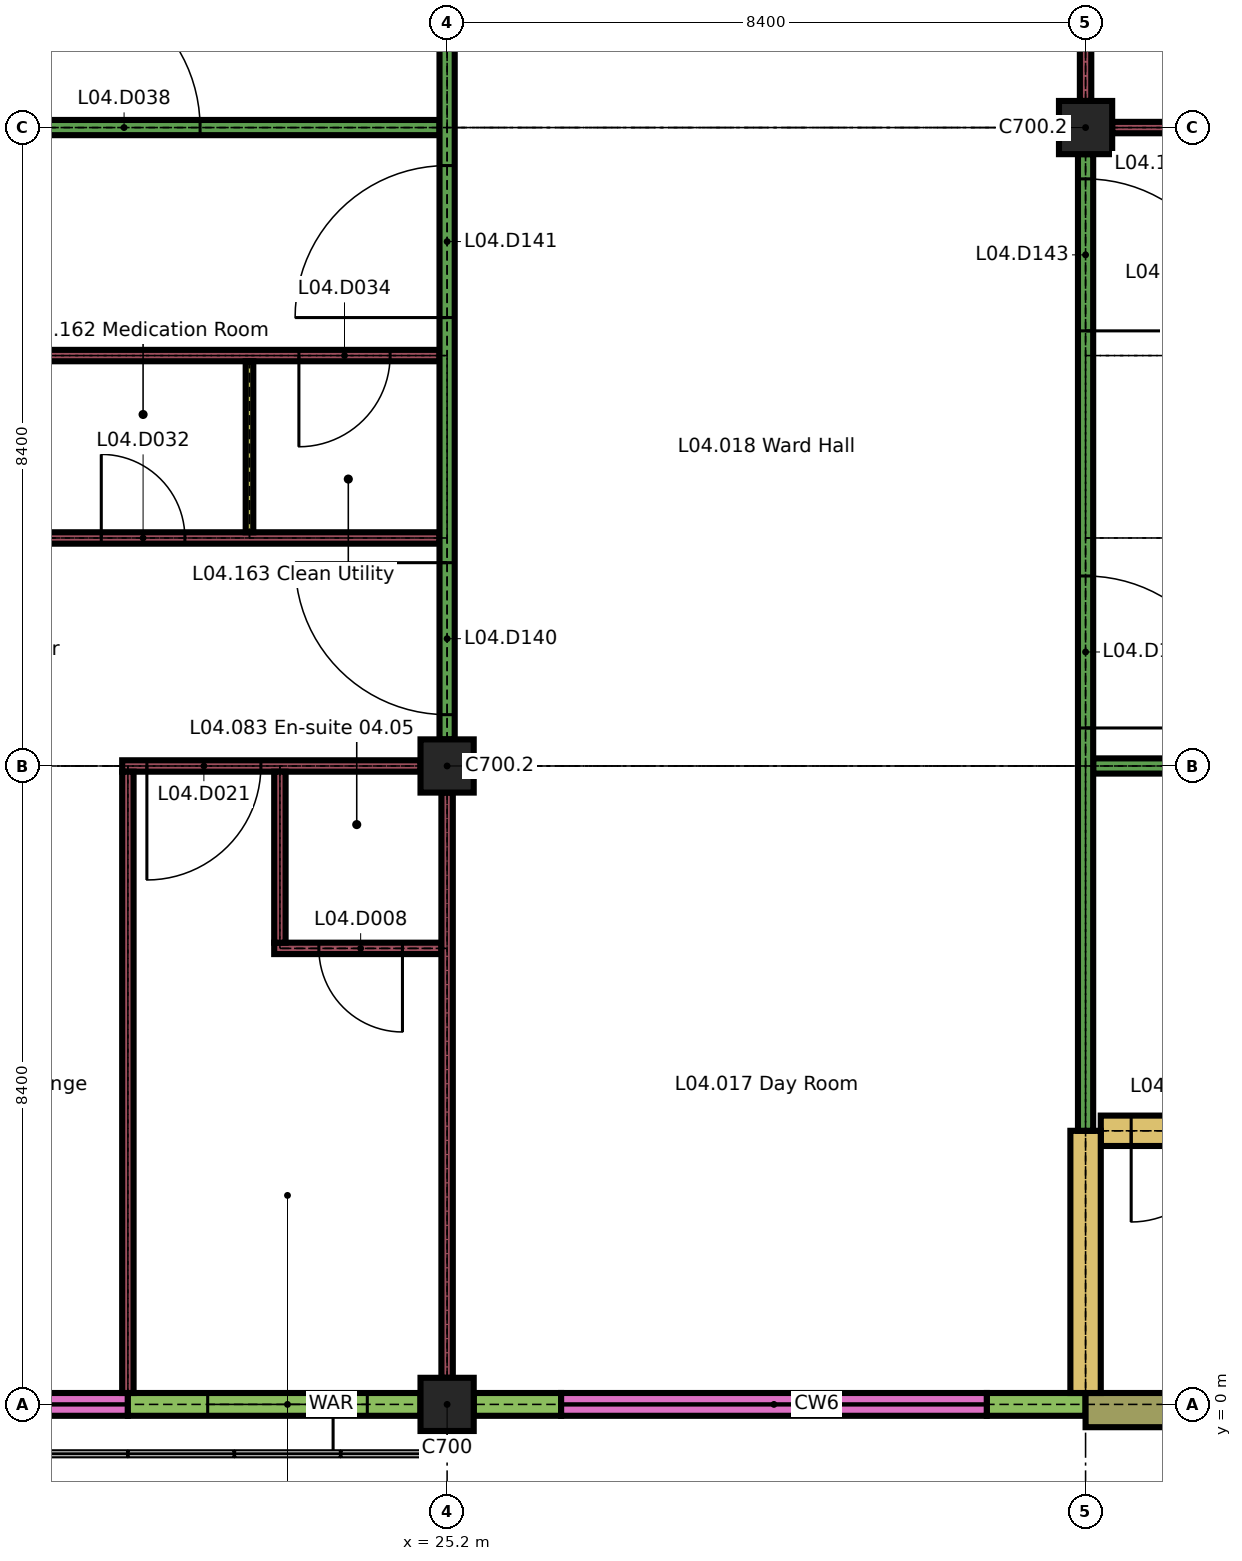
"""IFC4 building model, lengths in metres.
Left out: names, types, materials, properties, quantities, classifications, styles, units other than length and angle.
Written with IfcOpenShell. Run it as: python <this file> out.ifc"""

import sys

from ifc_helpers import new_model, si_unit, direction, frame, frame_2d, origin, origin_2d, place, context, subcontext, project, spatial, rectangle, extrude, element, fill, save


model = new_model("IFC4")
c1 = context("Model", 3, precision=1e-05, world=origin(), true_north=direction((0.0, 1.0)))
c2 = subcontext(c1, "Body", "Model", "MODEL_VIEW")
j1 = project(units=[si_unit("LENGTHUNIT", "METRE"), si_unit("PLANEANGLEUNIT", "RADIAN")], contexts=[c1])
p1 = place(None, origin())
s1 = spatial("IfcSite", under=j1, at=p1, CompositionType="ELEMENT")
p2 = place(p1, origin())
s2 = spatial("IfcBuilding", under=s1, at=p2, CompositionType="ELEMENT")
p3 = place(p2, frame((0.0, 0.0, 18.9)))
s3 = spatial("IfcBuildingStorey", under=s2, at=p3, CompositionType="ELEMENT", Elevation=18.9)
for number, where, z_axis, x_axis in (
    (1, (25.2, 0.0, 0.0), (0.0, 0.0, 1.0), (1.0, 0.0, 0.0)),
    (2, (25.2, 8.4, 0.0), (0.0, 0.0, 1.0), (1.0, 0.0, 0.0)),
    (3, (33.6, 16.8, 0.0), (0.0, 0.0, 1.0), (1.0, 0.0, 0.0)),
):
    element("IfcColumn", number, at=place(p3, frame(where, z_axis=z_axis, x_axis=x_axis)), inside=s3, PredefinedType="COLUMN", context=c2, shape_type="SweptSolid", body=[
        extrude(rectangle(XDim=0.7, YDim=0.7, at=origin_2d()), origin(), (0.0, 0.0, 1.0), 3.26),
    ])
p4 = place(p3, frame((17.15, 0.0, 0.0), z_axis=(0.0, 0.0, 1.0), x_axis=(1.0, 0.0, 0.0)))
e4 = element("IfcWall", 4, at=p4, inside=s3, PredefinedType="SOLIDWALL", context=c2, shape_type="SweptSolid", body=[
    extrude(rectangle(XDim=3.85, YDim=0.3, at=frame_2d((1.925, 0.0))), origin(), (0.0, 0.0, 1.0), 0.6),
])
p5 = place(p3, frame((21.0, 0.0, 0.0), z_axis=(0.0, 0.0, 1.0), x_axis=(1.0, 0.0, 0.0)))
e5 = element("IfcWall", 5, at=p5, inside=s3, PredefinedType="SOLIDWALL", context=c2, shape_type="SweptSolid", body=[
    extrude(rectangle(XDim=3.85, YDim=0.3, at=frame_2d((1.925, 0.0))), origin(), (0.0, 0.0, 1.0), 2.96),
])
p6 = place(p5, frame((1.05, 0.0, 0.9)))
e6 = element("IfcOpeningElement", 6, at=p6, cuts=e5, PredefinedType="OPENING", context=c2, shape_type="SweptSolid", body=[
    extrude(rectangle(XDim=2.1, YDim=1.5, at=frame_2d((1.05, 0.75))), frame((0.0, 0.16, 0.0), z_axis=(0.0, -1.0, 0.0), x_axis=(1.0, 0.0, 0.0)), (0.0, 0.0, 1.0), 0.32),
])
p7 = place(p3, frame((25.55, 0.0, 0.0), z_axis=(0.0, 0.0, 1.0), x_axis=(1.0, 0.0, 0.0)))
e7 = element("IfcWall", 7, at=p7, inside=s3, PredefinedType="SOLIDWALL", context=c2, shape_type="SweptSolid", body=[
    extrude(rectangle(XDim=1.15, YDim=0.3, at=frame_2d((0.575, 0.0))), origin(), (0.0, 0.0, 1.0), 2.96),
])
p8 = place(p3, frame((32.3, 0.0, 0.0), z_axis=(0.0, 0.0, 1.0), x_axis=(1.0, 0.0, 0.0)))
e8 = element("IfcWall", 8, at=p8, inside=s3, PredefinedType="SOLIDWALL", context=c2, shape_type="SweptSolid", body=[
    extrude(rectangle(XDim=1.3, YDim=0.3, at=frame_2d((0.65, 0.0))), origin(), (0.0, 0.0, 1.0), 2.96),
])
p9 = place(p3, frame((26.7, 0.0, 0.0), z_axis=(0.0, 0.0, 1.0), x_axis=(1.0, 0.0, 0.0)))
e9 = element("IfcWall", 9, at=p9, inside=s3, PredefinedType="SOLIDWALL", context=c2, shape_type="SweptSolid", body=[
    extrude(rectangle(XDim=5.6, YDim=0.3, at=frame_2d((2.8, 0.0))), origin(), (0.0, 0.0, 1.0), 0.6),
])
p10 = place(p3, frame((33.6, -0.075, 0.0), z_axis=(0.0, 0.0, 1.0), x_axis=(1.0, 0.0, 0.0)))
e10 = element("IfcWall", 10, at=p10, inside=s3, PredefinedType="SOLIDWALL", context=c2, shape_type="SweptSolid", body=[
    extrude(rectangle(XDim=3.15, YDim=0.45, at=frame_2d((1.575, 0.0))), origin(), (0.0, 0.0, 1.0), 3.26),
])
p11 = place(p3, frame((33.8, 3.6, 0.0), z_axis=(0.0, 0.0, 1.0), x_axis=(1.0, 0.0, 0.0)))
e11 = element("IfcWall", 11, at=p11, inside=s3, PredefinedType="SHEAR", context=c2, shape_type="SweptSolid", body=[
    extrude(rectangle(XDim=8.05, YDim=0.4, at=frame_2d((4.025, 0.0))), origin(), (0.0, 0.0, 1.0), 3.26),
])
p12 = place(p11, frame((0.4, 0.0, 0.0)))
e12 = element("IfcOpeningElement", 12, at=p12, cuts=e11, PredefinedType="OPENING", context=c2, shape_type="SweptSolid", body=[
    extrude(rectangle(XDim=1.2, YDim=2.1, at=frame_2d((0.6, 1.05))), frame((0.0, 0.21, 0.0), z_axis=(0.0, -1.0, 0.0), x_axis=(1.0, 0.0, 0.0)), (0.0, 0.0, 1.0), 0.42),
])
p13 = place(p3, frame((22.925, 6.0, 0.0), z_axis=(0.0, 0.0, 1.0), x_axis=(1.0, 0.0, 0.0)))
e13 = element("IfcWall", 13, at=p13, inside=s3, PredefinedType="PARTITIONING", context=c2, shape_type="SweptSolid", body=[
    extrude(rectangle(XDim=2.2, YDim=0.15, at=frame_2d((1.1, 0.0))), origin(), (0.0, 0.0, 1.0), 3.26),
])
p14 = place(p13, frame((0.587, 0.0, 0.0)))
e14 = element("IfcOpeningElement", 14, at=p14, cuts=e13, PredefinedType="OPENING", context=c2, shape_type="SweptSolid", body=[
    extrude(rectangle(XDim=1.1, YDim=2.1, at=frame_2d((0.55, 1.05))), frame((0.0, 0.085, 0.0), z_axis=(0.0, -1.0, 0.0), x_axis=(1.0, 0.0, 0.0)), (0.0, 0.0, 1.0), 0.17),
])
p15 = place(p3, frame((20.925, 8.4, 0.0), z_axis=(0.0, 0.0, 1.0), x_axis=(1.0, 0.0, 0.0)))
e15 = element("IfcWall", 15, at=p15, inside=s3, PredefinedType="PARTITIONING", context=c2, shape_type="SweptSolid", body=[
    extrude(rectangle(XDim=3.925, YDim=0.15, at=frame_2d((1.962, 0.0))), origin(), (0.0, 0.0, 1.0), 3.26),
])
p16 = place(p15, frame((0.325, 0.0, 0.0)))
e16 = element("IfcOpeningElement", 16, at=p16, cuts=e15, PredefinedType="OPENING", context=c2, shape_type="SweptSolid", body=[
    extrude(rectangle(XDim=1.5, YDim=2.4, at=frame_2d((0.75, 1.2))), frame((0.0, 0.085, 0.0), z_axis=(0.0, -1.0, 0.0), x_axis=(1.0, 0.0, 0.0)), (0.0, 0.0, 1.0), 0.17),
])
p17 = place(p3, frame((33.7, 8.4, 0.0), z_axis=(0.0, 0.0, 1.0), x_axis=(1.0, 0.0, 0.0)))
e17 = element("IfcWall", 17, at=p17, inside=s3, PredefinedType="PARTITIONING", context=c2, shape_type="SweptSolid", body=[
    extrude(rectangle(XDim=8.15, YDim=0.2, at=frame_2d((4.075, 0.0))), origin(), (0.0, 0.0, 1.0), 3.26),
])
p18 = place(p17, frame((3.075, 0.0, 0.0)))
e18 = element("IfcOpeningElement", 18, at=p18, cuts=e17, PredefinedType="OPENING", context=c2, shape_type="SweptSolid", body=[
    extrude(rectangle(XDim=2.0, YDim=2.4, at=frame_2d((1.0, 1.2))), frame((0.0, 0.11, 0.0), z_axis=(0.0, -1.0, 0.0), x_axis=(1.0, 0.0, 0.0)), (0.0, 0.0, 1.0), 0.22),
])
p19 = place(p3, frame((19.725, 11.4, 0.0), z_axis=(0.0, 0.0, 1.0), x_axis=(1.0, 0.0, 0.0)))
e19 = element("IfcWall", 19, at=p19, inside=s3, PredefinedType="PARTITIONING", context=c2, shape_type="SweptSolid", body=[
    extrude(rectangle(XDim=5.375, YDim=0.15, at=frame_2d((2.688, 0.0))), origin(), (0.0, 0.0, 1.0), 3.26),
])
p20 = place(p19, frame((0.925, 0.0, 0.0)))
e20 = element("IfcOpeningElement", 20, at=p20, cuts=e19, PredefinedType="OPENING", context=c2, shape_type="SweptSolid", body=[
    extrude(rectangle(XDim=1.1, YDim=2.1, at=frame_2d((0.55, 1.05))), frame((0.0, 0.085, 0.0), z_axis=(0.0, -1.0, 0.0), x_axis=(1.0, 0.0, 0.0)), (0.0, 0.0, 1.0), 0.17),
])
p21 = place(p3, frame((11.325, 13.8, 0.0), z_axis=(0.0, 0.0, 1.0), x_axis=(1.0, 0.0, 0.0)))
e21 = element("IfcWall", 21, at=p21, inside=s3, PredefinedType="PARTITIONING", context=c2, shape_type="SweptSolid", body=[
    extrude(rectangle(XDim=13.775, YDim=0.15, at=frame_2d((6.888, 0.0))), origin(), (0.0, 0.0, 1.0), 3.26),
])
p22 = place(p21, frame((11.925, 0.0, 0.0)))
e22 = element("IfcOpeningElement", 22, at=p22, cuts=e21, PredefinedType="OPENING", context=c2, shape_type="SweptSolid", body=[
    extrude(rectangle(XDim=1.2, YDim=2.1, at=frame_2d((0.6, 1.05))), frame((0.0, 0.085, 0.0), z_axis=(0.0, -1.0, 0.0), x_axis=(1.0, 0.0, 0.0)), (0.0, 0.0, 1.0), 0.17),
])
p23 = place(p3, frame((16.7, 16.8, 0.0), z_axis=(0.0, 0.0, 1.0), x_axis=(1.0, 0.0, 0.0)))
e23 = element("IfcWall", 23, at=p23, inside=s3, PredefinedType="PARTITIONING", context=c2, shape_type="SweptSolid", body=[
    extrude(rectangle(XDim=8.4, YDim=0.2, at=frame_2d((4.2, 0.0))), origin(), (0.0, 0.0, 1.0), 3.26),
])
p24 = place(p23, frame((3.25, 0.0, 0.0)))
e24 = element("IfcOpeningElement", 24, at=p24, cuts=e23, PredefinedType="OPENING", context=c2, shape_type="SweptSolid", body=[
    extrude(rectangle(XDim=2.0, YDim=2.4, at=frame_2d((1.0, 1.2))), frame((0.0, 0.11, 0.0), z_axis=(0.0, -1.0, 0.0), x_axis=(1.0, 0.0, 0.0)), (0.0, 0.0, 1.0), 0.22),
])
p25 = place(p3, frame((33.95, 16.8, 0.0), z_axis=(0.0, 0.0, 1.0), x_axis=(1.0, 0.0, 0.0)))
e25 = element("IfcWall", 25, at=p25, inside=s3, PredefinedType="PARTITIONING", context=c2, shape_type="SweptSolid", body=[
    extrude(rectangle(XDim=7.675, YDim=0.15, at=frame_2d((3.837, 0.0))), origin(), (0.0, 0.0, 1.0), 3.26),
])
p26 = place(p25, frame((2.1, 0.0, 0.0)))
e26 = element("IfcOpeningElement", 26, at=p26, cuts=e25, PredefinedType="OPENING", context=c2, shape_type="SweptSolid", body=[
    extrude(rectangle(XDim=1.5, YDim=2.4, at=frame_2d((0.75, 1.2))), frame((0.0, 0.085, 0.0), z_axis=(0.0, -1.0, 0.0), x_axis=(1.0, 0.0, 0.0)), (0.0, 0.0, 1.0), 0.17),
])
p27 = place(p25, frame((5.163, 0.0, 0.0)))
e27 = element("IfcOpeningElement", 27, at=p27, cuts=e25, PredefinedType="OPENING", context=c2, shape_type="SweptSolid", body=[
    extrude(rectangle(XDim=1.2, YDim=2.1, at=frame_2d((0.6, 1.05))), frame((0.0, 0.085, 0.0), z_axis=(0.0, -1.0, 0.0), x_axis=(1.0, 0.0, 0.0)), (0.0, 0.0, 1.0), 0.17),
])
p28 = place(p3, frame((21.0, 0.15, 0.0), z_axis=(0.0, 0.0, 1.0), x_axis=(0.0, 1.0, 0.0)))
e28 = element("IfcWall", 28, at=p28, inside=s3, PredefinedType="PARTITIONING", context=c2, shape_type="SweptSolid", body=[
    extrude(rectangle(XDim=8.175, YDim=0.15, at=frame_2d((4.087, 0.0))), origin(), (0.0, 0.0, 1.0), 3.26),
])
p29 = place(p3, frame((22.6, 11.475, 0.0), z_axis=(0.0, 0.0, 1.0), x_axis=(0.0, 1.0, 0.0)))
e29 = element("IfcWall", 29, at=p29, inside=s3, PredefinedType="PARTITIONING", context=c2, shape_type="SweptSolid", body=[
    extrude(rectangle(XDim=2.25, YDim=0.1, at=frame_2d((1.125, 0.0))), origin(), (0.0, 0.0, 1.0), 3.26),
])
p30 = place(p3, frame((23.0, 6.075, 0.0), z_axis=(0.0, 0.0, 1.0), x_axis=(0.0, 1.0, 0.0)))
e30 = element("IfcWall", 30, at=p30, inside=s3, PredefinedType="PARTITIONING", context=c2, shape_type="SweptSolid", body=[
    extrude(rectangle(XDim=2.25, YDim=0.15, at=frame_2d((1.125, 0.0))), origin(), (0.0, 0.0, 1.0), 3.26),
])
p31 = place(p3, frame((25.2, 0.35, 0.0), z_axis=(0.0, 0.0, 1.0), x_axis=(0.0, 1.0, 0.0)))
e31 = element("IfcWall", 31, at=p31, inside=s3, PredefinedType="PARTITIONING", context=c2, shape_type="SweptSolid", body=[
    extrude(rectangle(XDim=7.7, YDim=0.15, at=frame_2d((3.85, 0.0))), origin(), (0.0, 0.0, 1.0), 3.26),
])
p32 = place(p3, frame((25.2, 8.75, 0.0), z_axis=(0.0, 0.0, 1.0), x_axis=(0.0, 1.0, 0.0)))
e32 = element("IfcWall", 32, at=p32, inside=s3, PredefinedType="PARTITIONING", context=c2, shape_type="SweptSolid", body=[
    extrude(rectangle(XDim=12.85, YDim=0.2, at=frame_2d((6.425, 0.0))), origin(), (0.0, 0.0, 1.0), 3.26),
])
p33 = place(p32, frame((0.325, 0.0, 0.0)))
e33 = element("IfcOpeningElement", 33, at=p33, cuts=e32, PredefinedType="OPENING", context=c2, shape_type="SweptSolid", body=[
    extrude(rectangle(XDim=2.0, YDim=2.4, at=frame_2d((1.0, 1.2))), frame((0.0, 0.11, 0.0), z_axis=(0.0, -1.0, 0.0), x_axis=(1.0, 0.0, 0.0)), (0.0, 0.0, 1.0), 0.22),
])
p34 = place(p32, frame((5.55, 0.0, 0.0)))
e34 = element("IfcOpeningElement", 34, at=p34, cuts=e32, PredefinedType="OPENING", context=c2, shape_type="SweptSolid", body=[
    extrude(rectangle(XDim=2.0, YDim=2.4, at=frame_2d((1.0, 1.2))), frame((0.0, 0.11, 0.0), z_axis=(0.0, -1.0, 0.0), x_axis=(1.0, 0.0, 0.0)), (0.0, 0.0, 1.0), 0.22),
])
p35 = place(p3, frame((33.6, 0.15, 0.0), z_axis=(0.0, 0.0, 1.0), x_axis=(0.0, 1.0, 0.0)))
e35 = element("IfcWall", 35, at=p35, inside=s3, PredefinedType="SHEAR", context=c2, shape_type="SweptSolid", body=[
    extrude(rectangle(XDim=3.45, YDim=0.4, at=frame_2d((1.725, 0.0))), origin(), (0.0, 0.0, 1.0), 3.26),
])
p36 = place(p3, frame((33.6, 3.6, 0.0), z_axis=(0.0, 0.0, 1.0), x_axis=(0.0, 1.0, 0.0)))
e36 = element("IfcWall", 36, at=p36, inside=s3, PredefinedType="PARTITIONING", context=c2, shape_type="SweptSolid", body=[
    extrude(rectangle(XDim=12.85, YDim=0.2, at=frame_2d((6.425, 0.0))), origin(), (0.0, 0.0, 1.0), 3.26),
])
p37 = place(p36, frame((5.3, 0.0, 0.0)))
e37 = element("IfcOpeningElement", 37, at=p37, cuts=e36, PredefinedType="OPENING", context=c2, shape_type="SweptSolid", body=[
    extrude(rectangle(XDim=2.0, YDim=2.4, at=frame_2d((1.0, 1.2))), frame((0.0, 0.11, 0.0), z_axis=(0.0, -1.0, 0.0), x_axis=(1.0, 0.0, 0.0)), (0.0, 0.0, 1.0), 0.22),
])
p38 = place(p36, frame((10.525, 0.0, 0.0)))
e38 = element("IfcOpeningElement", 38, at=p38, cuts=e36, PredefinedType="OPENING", context=c2, shape_type="SweptSolid", body=[
    extrude(rectangle(XDim=2.0, YDim=2.4, at=frame_2d((1.0, 1.2))), frame((0.0, 0.11, 0.0), z_axis=(0.0, -1.0, 0.0), x_axis=(1.0, 0.0, 0.0)), (0.0, 0.0, 1.0), 0.22),
])
p39 = place(p3, frame((33.6, 17.15, 0.0), z_axis=(0.0, 0.0, 1.0), x_axis=(0.0, 1.0, 0.0)))
e39 = element("IfcWall", 39, at=p39, inside=s3, PredefinedType="PARTITIONING", context=c2, shape_type="SweptSolid", body=[
    extrude(rectangle(XDim=7.7, YDim=0.15, at=frame_2d((3.85, 0.0))), origin(), (0.0, 0.0, 1.0), 3.26),
])
p40 = place(p6, origin())
e40 = element("IfcWindow", 40, at=p40, inside=s3, PartitioningType="DOUBLE_PANEL_VERTICAL", PredefinedType="WINDOW", context=c2, shape_type="SweptSolid", body=[
    extrude(rectangle(XDim=2.1, YDim=1.5, at=frame_2d((1.05, 0.75))), frame((0.0, 0.05, 0.0), z_axis=(0.0, -1.0, 0.0), x_axis=(1.0, 0.0, 0.0)), (0.0, 0.0, 1.0), 0.1),
])
fill(e6, e40)
p41 = place(p12, origin())
e41 = element("IfcDoor", 41, at=p41, inside=s3, OperationType="SINGLE_SWING_LEFT", PredefinedType="DOOR", context=c2, shape_type="SweptSolid", body=[
    extrude(rectangle(XDim=1.2, YDim=2.1, at=frame_2d((0.6, 1.05))), frame((0.0, 0.025, 0.0), z_axis=(0.0, -1.0, 0.0), x_axis=(1.0, 0.0, 0.0)), (0.0, 0.0, 1.0), 0.05),
])
fill(e12, e41)
p42 = place(p14, origin())
e42 = element("IfcDoor", 42, at=p42, inside=s3, OperationType="SINGLE_SWING_RIGHT", PredefinedType="DOOR", context=c2, shape_type="SweptSolid", body=[
    extrude(rectangle(XDim=1.1, YDim=2.1, at=frame_2d((0.55, 1.05))), frame((0.0, 0.025, 0.0), z_axis=(0.0, -1.0, 0.0), x_axis=(1.0, 0.0, 0.0)), (0.0, 0.0, 1.0), 0.05),
])
fill(e14, e42)
p43 = place(p16, origin())
e43 = element("IfcDoor", 43, at=p43, inside=s3, OperationType="SINGLE_SWING_LEFT", PredefinedType="DOOR", context=c2, shape_type="SweptSolid", body=[
    extrude(rectangle(XDim=1.5, YDim=2.4, at=frame_2d((0.75, 1.2))), frame((0.0, 0.03, 0.0), z_axis=(0.0, -1.0, 0.0), x_axis=(1.0, 0.0, 0.0)), (0.0, 0.0, 1.0), 0.06),
])
fill(e16, e43)
p44 = place(p20, origin())
e44 = element("IfcDoor", 44, at=p44, inside=s3, OperationType="SINGLE_SWING_RIGHT", PredefinedType="DOOR", context=c2, shape_type="SweptSolid", body=[
    extrude(rectangle(XDim=1.1, YDim=2.1, at=frame_2d((0.55, 1.05))), frame((0.0, 0.025, 0.0), z_axis=(0.0, -1.0, 0.0), x_axis=(1.0, 0.0, 0.0)), (0.0, 0.0, 1.0), 0.05),
])
fill(e20, e44)
p45 = place(p22, origin())
e45 = element("IfcDoor", 45, at=p45, inside=s3, OperationType="SINGLE_SWING_LEFT", PredefinedType="DOOR", context=c2, shape_type="SweptSolid", body=[
    extrude(rectangle(XDim=1.2, YDim=2.1, at=frame_2d((0.6, 1.05))), frame((0.0, 0.025, 0.0), z_axis=(0.0, -1.0, 0.0), x_axis=(1.0, 0.0, 0.0)), (0.0, 0.0, 1.0), 0.05),
])
fill(e22, e45)
p46 = place(p24, origin())
e46 = element("IfcDoor", 46, at=p46, inside=s3, OperationType="SINGLE_SWING_RIGHT", PredefinedType="DOOR", context=c2, shape_type="SweptSolid", body=[
    extrude(rectangle(XDim=2.0, YDim=2.4, at=frame_2d((1.0, 1.2))), frame((0.0, 0.03, 0.0), z_axis=(0.0, -1.0, 0.0), x_axis=(1.0, 0.0, 0.0)), (0.0, 0.0, 1.0), 0.06),
])
fill(e24, e46)
p47 = place(p33, origin())
e47 = element("IfcDoor", 47, at=p47, inside=s3, OperationType="SINGLE_SWING_LEFT", PredefinedType="DOOR", context=c2, shape_type="SweptSolid", body=[
    extrude(rectangle(XDim=2.0, YDim=2.4, at=frame_2d((1.0, 1.2))), frame((0.0, 0.03, 0.0), z_axis=(0.0, -1.0, 0.0), x_axis=(1.0, 0.0, 0.0)), (0.0, 0.0, 1.0), 0.06),
])
fill(e33, e47)
p48 = place(p34, origin())
e48 = element("IfcDoor", 48, at=p48, inside=s3, OperationType="SINGLE_SWING_RIGHT", PredefinedType="DOOR", context=c2, shape_type="SweptSolid", body=[
    extrude(rectangle(XDim=2.0, YDim=2.4, at=frame_2d((1.0, 1.2))), frame((0.0, 0.03, 0.0), z_axis=(0.0, -1.0, 0.0), x_axis=(1.0, 0.0, 0.0)), (0.0, 0.0, 1.0), 0.06),
])
fill(e34, e48)
p49 = place(p37, origin())
e49 = element("IfcDoor", 49, at=p49, inside=s3, OperationType="SINGLE_SWING_LEFT", PredefinedType="DOOR", context=c2, shape_type="SweptSolid", body=[
    extrude(rectangle(XDim=2.0, YDim=2.4, at=frame_2d((1.0, 1.2))), frame((0.0, 0.03, 0.0), z_axis=(0.0, -1.0, 0.0), x_axis=(1.0, 0.0, 0.0)), (0.0, 0.0, 1.0), 0.06),
])
fill(e37, e49)
p50 = place(p38, origin())
e50 = element("IfcDoor", 50, at=p50, inside=s3, OperationType="SINGLE_SWING_LEFT", PredefinedType="DOOR", context=c2, shape_type="SweptSolid", body=[
    extrude(rectangle(XDim=2.0, YDim=2.4, at=frame_2d((1.0, 1.2))), frame((0.0, 0.03, 0.0), z_axis=(0.0, -1.0, 0.0), x_axis=(1.0, 0.0, 0.0)), (0.0, 0.0, 1.0), 0.06),
])
fill(e38, e50)
save(model, sys.argv[1])
